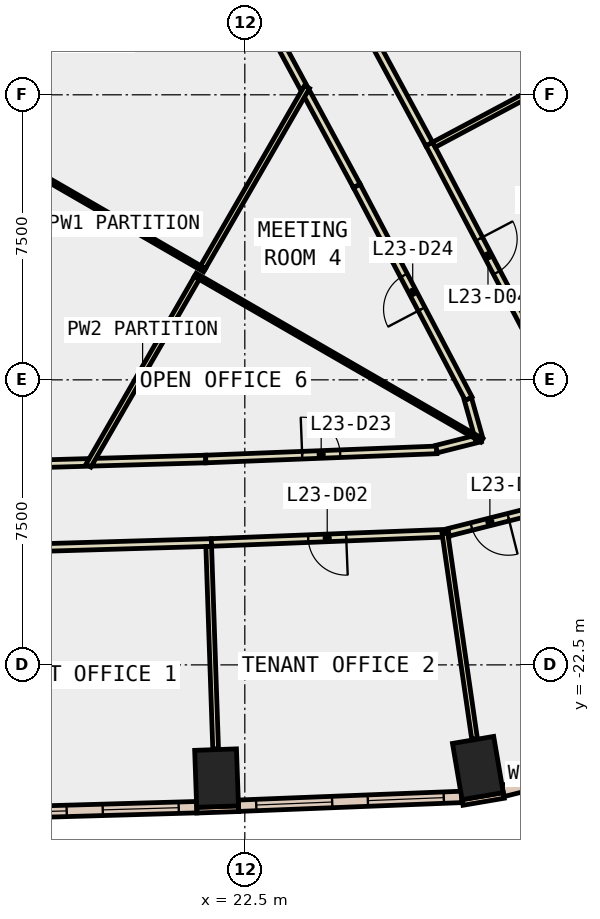
"""IFC4 building model, lengths in metres.
Left out: names, types, materials, properties, quantities, classifications, styles, units other than length and angle.
Written with IfcOpenShell. Run it as: python <this file> out.ifc"""

import sys

from ifc_helpers import new_model, si_unit, direction, frame, frame_2d, origin, origin_2d, place, context, subcontext, project, spatial, rectangle, extrude, element, fill, save


model = new_model("IFC4")
c1 = context("Model", 3, precision=1e-05, world=origin(), true_north=direction((0.0, 1.0)))
c2 = subcontext(c1, "Body", "Model", "MODEL_VIEW")
j1 = project(units=[si_unit("LENGTHUNIT", "METRE"), si_unit("PLANEANGLEUNIT", "RADIAN")], contexts=[c1])
p1 = place(None, origin())
s1 = spatial("IfcSite", under=j1, at=p1, CompositionType="ELEMENT")
p2 = place(p1, origin())
s2 = spatial("IfcBuilding", under=s1, at=p2, CompositionType="ELEMENT")
p3 = place(p2, frame((0.0, 0.0, 107.6)))
s3 = spatial("IfcBuildingStorey", under=s2, at=p3, CompositionType="ELEMENT", Elevation=107.6)
for number, where, z_axis, x_axis in (
    (1, (21.757, -25.479, -0.4), (0.0, 0.0, 1.0), (0.999, 0.035, 0.0)),
    (2, (28.633, -25.214, -0.4), (0.0, 0.0, 1.0), (0.986, 0.168, 0.0)),
):
    element("IfcColumn", number, at=place(p3, frame(where, z_axis=z_axis, x_axis=x_axis)), inside=s3, PredefinedType="COLUMN", context=c2, shape_type="SweptSolid", body=[
        extrude(rectangle(XDim=1.1, YDim=1.5, at=origin_2d()), origin(), (0.0, 0.0, 1.0), 4.2),
    ])
p4 = place(p3, frame((21.237, -26.323, 0.0), z_axis=(0.0, 0.0, 1.0), x_axis=(0.999368780235, 0.035525217693, 0.0)))
e3 = element("IfcWall", 3, at=p4, inside=s3, PredefinedType="STANDARD", context=c2, shape_type="SweptSolid", body=[
    extrude(rectangle(XDim=1.1, YDim=0.15, at=frame_2d((0.55, 0.0))), origin(), (0.0, 0.0, 1.0), 3.8),
])
p5 = place(p3, frame((28.229, -26.12, 0.0), z_axis=(0.0, 0.0, 1.0), x_axis=(0.985763338892, 0.168138751323, 0.0)))
e4 = element("IfcWall", 4, at=p5, inside=s3, PredefinedType="STANDARD", context=c2, shape_type="SweptSolid", body=[
    extrude(rectangle(XDim=1.101, YDim=0.15, at=frame_2d((0.55, 0.0))), origin(), (0.0, 0.0, 1.0), 3.8),
])
p6 = place(p3, frame((15.34, -26.413, 0.0), z_axis=(0.0, 0.0, 1.0), x_axis=(0.999588397616, 0.028688592709, 0.0)))
e5 = element("IfcWall", 5, at=p6, inside=s3, PredefinedType="STANDARD", context=c2, shape_type="SweptSolid", body=[
    extrude(rectangle(XDim=5.897, YDim=0.3, at=frame_2d((2.949, 0.0))), origin(), (0.0, 0.0, 1.0), 3.8),
])
p7 = place(p6, frame((0.474, 0.0, 0.9)))
e6 = element("IfcOpeningElement", 6, at=p7, cuts=e5, PredefinedType="OPENING", context=c2, shape_type="SweptSolid", body=[
    extrude(rectangle(XDim=2.0, YDim=2.6, at=frame_2d((1.0, 1.3))), frame((0.0, 0.16, 0.0), z_axis=(0.0, -1.0, 0.0), x_axis=(1.0, 0.0, 0.0)), (0.0, 0.0, 1.0), 0.32),
])
p8 = place(p6, frame((3.423, 0.0, 0.9)))
e7 = element("IfcOpeningElement", 7, at=p8, cuts=e5, PredefinedType="OPENING", context=c2, shape_type="SweptSolid", body=[
    extrude(rectangle(XDim=2.0, YDim=2.6, at=frame_2d((1.0, 1.3))), frame((0.0, 0.16, 0.0), z_axis=(0.0, -1.0, 0.0), x_axis=(1.0, 0.0, 0.0)), (0.0, 0.0, 1.0), 0.32),
])
p9 = place(p3, frame((22.332, -26.206, 0.0), z_axis=(0.0, 0.0, 1.0), x_axis=(0.99922113396, 0.039460428885, 0.0)))
e8 = element("IfcWall", 8, at=p9, inside=s3, PredefinedType="STANDARD", context=c2, shape_type="SweptSolid", body=[
    extrude(rectangle(XDim=5.878, YDim=0.3, at=frame_2d((2.939, 0.0))), origin(), (0.0, 0.0, 1.0), 3.8),
])
p10 = place(p9, frame((0.469, 0.0, 0.9)))
e9 = element("IfcOpeningElement", 9, at=p10, cuts=e8, PredefinedType="OPENING", context=c2, shape_type="SweptSolid", body=[
    extrude(rectangle(XDim=2.0, YDim=2.6, at=frame_2d((1.0, 1.3))), frame((0.0, 0.16, 0.0), z_axis=(0.0, -1.0, 0.0), x_axis=(1.0, 0.0, 0.0)), (0.0, 0.0, 1.0), 0.32),
])
p11 = place(p9, frame((3.408, 0.0, 0.9)))
e10 = element("IfcOpeningElement", 10, at=p11, cuts=e8, PredefinedType="OPENING", context=c2, shape_type="SweptSolid", body=[
    extrude(rectangle(XDim=2.0, YDim=2.6, at=frame_2d((1.0, 1.3))), frame((0.0, 0.16, 0.0), z_axis=(0.0, -1.0, 0.0), x_axis=(1.0, 0.0, 0.0)), (0.0, 0.0, 1.0), 0.32),
])
p12 = place(p3, frame((29.293, -25.818, 0.0), z_axis=(0.0, 0.0, 1.0), x_axis=(0.969658938481, 0.244461741432, 0.0)))
e11 = element("IfcWall", 11, at=p12, inside=s3, PredefinedType="STANDARD", context=c2, shape_type="SweptSolid", body=[
    extrude(rectangle(XDim=3.727, YDim=0.3, at=frame_2d((1.864, 0.0))), origin(), (0.0, 0.0, 1.0), 3.8),
])
p13 = place(p12, frame((1.164, 0.0, 0.9)))
e12 = element("IfcOpeningElement", 12, at=p13, cuts=e11, PredefinedType="OPENING", context=c2, shape_type="SweptSolid", body=[
    extrude(rectangle(XDim=1.4, YDim=2.6, at=frame_2d((0.7, 1.3))), frame((0.0, 0.16, 0.0), z_axis=(0.0, -1.0, 0.0), x_axis=(1.0, 0.0, 0.0)), (0.0, 0.0, 1.0), 0.32),
])
p14 = place(p3, frame((14.519, -17.283, 0.0), z_axis=(0.0, 0.0, 1.0), x_axis=(0.999591204998, 0.028590608419, 0.0)))
e13 = element("IfcWall", 13, at=p14, inside=s3, PredefinedType="PARTITIONING", context=c2, shape_type="SweptSolid", body=[
    extrude(rectangle(XDim=3.843, YDim=0.2, at=frame_2d((1.921, 0.0))), origin(), (0.0, 0.0, 1.0), 3.8),
])
p15 = place(p3, frame((24.051, -7.315, 0.0), z_axis=(0.0, 0.0, 1.0), x_axis=(-0.475308630647, 0.87981913234, 0.0)))
e14 = element("IfcWall", 14, at=p15, inside=s3, PredefinedType="PARTITIONING", context=c2, shape_type="SweptSolid", body=[
    extrude(rectangle(XDim=4.166, YDim=0.2, at=frame_2d((2.083, 0.0))), origin(), (0.0, 0.0, 1.0), 3.8),
])
p16 = place(p3, frame((18.509, -17.168, 0.0), z_axis=(0.0, 0.0, 1.0), x_axis=(0.999588854267, 0.028672677323, 0.0)))
e15 = element("IfcWall", 15, at=p16, inside=s3, PredefinedType="PARTITIONING", context=c2, shape_type="SweptSolid", body=[
    extrude(rectangle(XDim=2.963, YDim=0.2, at=frame_2d((1.481, 0.0))), origin(), (0.0, 0.0, 1.0), 3.8),
])
p17 = place(p3, frame((21.471, -17.083, 0.0), z_axis=(0.0, 0.0, 1.0), x_axis=(0.999221407079, 0.039453512338, 0.0)))
e16 = element("IfcWall", 16, at=p17, inside=s3, PredefinedType="PARTITIONING", context=c2, shape_type="SweptSolid", body=[
    extrude(rectangle(XDim=6.083, YDim=0.2, at=frame_2d((3.042, 0.0))), origin(), (0.0, 0.0, 1.0), 3.8),
])
p18 = place(p17, frame((2.541, 0.0, 0.0)))
e17 = element("IfcOpeningElement", 17, at=p18, cuts=e16, PredefinedType="OPENING", context=c2, shape_type="SweptSolid", body=[
    extrude(rectangle(XDim=1.0, YDim=2.1, at=frame_2d((0.5, 1.05))), frame((0.0, 0.11, 0.0), z_axis=(0.0, -1.0, 0.0), x_axis=(1.0, 0.0, 0.0)), (0.0, 0.0, 1.0), 0.22),
])
p19 = place(p3, frame((27.546, -16.822, 0.0), z_axis=(0.0, 0.0, 1.0), x_axis=(0.969694756333, 0.244319625777, 0.0)))
e18 = element("IfcWall", 18, at=p19, inside=s3, PredefinedType="PARTITIONING", context=c2, shape_type="SweptSolid", body=[
    extrude(rectangle(XDim=1.191, YDim=0.2, at=frame_2d((0.596, 0.0))), origin(), (0.0, 0.0, 1.0), 3.8),
])
p20 = place(p3, frame((28.662, -16.541, 0.0), z_axis=(0.0, 0.0, 1.0), x_axis=(-0.270771802087, 0.96264356394, 0.0)))
e19 = element("IfcWall", 19, at=p20, inside=s3, PredefinedType="PARTITIONING", context=c2, shape_type="SweptSolid", body=[
    extrude(rectangle(XDim=1.078, YDim=0.2, at=frame_2d((0.539, 0.0))), origin(), (0.0, 0.0, 1.0), 3.8),
])
p21 = place(p3, frame((28.39, -15.495, 0.0), z_axis=(0.0, 0.0, 1.0), x_axis=(-0.465367816287, 0.885117390838, 0.0)))
e20 = element("IfcWall", 20, at=p21, inside=s3, PredefinedType="PARTITIONING", context=c2, shape_type="SweptSolid", body=[
    extrude(rectangle(XDim=6.326, YDim=0.2, at=frame_2d((3.163, 0.0))), origin(), (0.0, 0.0, 1.0), 3.8),
])
p22 = place(p21, frame((2.663, 0.0, 0.0)))
e21 = element("IfcOpeningElement", 21, at=p22, cuts=e20, PredefinedType="OPENING", context=c2, shape_type="SweptSolid", body=[
    extrude(rectangle(XDim=1.0, YDim=2.1, at=frame_2d((0.5, 1.05))), frame((0.0, 0.11, 0.0), z_axis=(0.0, -1.0, 0.0), x_axis=(1.0, 0.0, 0.0)), (0.0, 0.0, 1.0), 0.22),
])
p23 = place(p3, frame((25.446, -9.896, 0.0), z_axis=(0.0, 0.0, 1.0), x_axis=(-0.475427182652, 0.879755076141, 0.0)))
e22 = element("IfcWall", 22, at=p23, inside=s3, PredefinedType="PARTITIONING", context=c2, shape_type="SweptSolid", body=[
    extrude(rectangle(XDim=2.785, YDim=0.2, at=frame_2d((1.393, 0.0))), origin(), (0.0, 0.0, 1.0), 3.8),
])
p24 = place(p3, frame((21.621, -19.28, 0.0), z_axis=(0.0, 0.0, 1.0), x_axis=(-0.999557957525, -0.029730280001, 0.0)))
e23 = element("IfcWall", 23, at=p24, inside=s3, PredefinedType="PARTITIONING", context=c2, shape_type="SweptSolid", body=[
    extrude(rectangle(XDim=13.927, YDim=0.2, at=frame_2d((6.964, 0.0))), origin(), (0.0, 0.0, 1.0), 3.8),
])
p25 = place(p24, frame((6.464, 0.0, 0.0)))
e24 = element("IfcOpeningElement", 24, at=p25, cuts=e23, PredefinedType="OPENING", context=c2, shape_type="SweptSolid", body=[
    extrude(rectangle(XDim=1.0, YDim=2.1, at=frame_2d((0.5, 1.05))), frame((0.0, 0.11, 0.0), z_axis=(0.0, -1.0, 0.0), x_axis=(1.0, 0.0, 0.0)), (0.0, 0.0, 1.0), 0.22),
])
p26 = place(p3, frame((27.865, -19.032, 0.0), z_axis=(0.0, 0.0, 1.0), x_axis=(-0.999218029978, -0.039538950003, 0.0)))
e25 = element("IfcWall", 25, at=p26, inside=s3, PredefinedType="PARTITIONING", context=c2, shape_type="SweptSolid", body=[
    extrude(rectangle(XDim=6.249, YDim=0.2, at=frame_2d((3.125, 0.0))), origin(), (0.0, 0.0, 1.0), 3.8),
])
p27 = place(p26, frame((2.699, 0.0, 0.0)))
e26 = element("IfcOpeningElement", 26, at=p27, cuts=e25, PredefinedType="OPENING", context=c2, shape_type="SweptSolid", body=[
    extrude(rectangle(XDim=1.0, YDim=2.1, at=frame_2d((0.5, 1.05))), frame((0.0, 0.11, 0.0), z_axis=(0.0, -1.0, 0.0), x_axis=(1.0, 0.0, 0.0)), (0.0, 0.0, 1.0), 0.22),
])
p28 = place(p3, frame((30.037, -18.463, 0.0), z_axis=(0.0, 0.0, 1.0), x_axis=(-0.969686214682, -0.244353524746, 0.0)))
e27 = element("IfcWall", 27, at=p28, inside=s3, PredefinedType="PARTITIONING", context=c2, shape_type="SweptSolid", body=[
    extrude(rectangle(XDim=2.243, YDim=0.2, at=frame_2d((1.122, 0.0))), origin(), (0.0, 0.0, 1.0), 3.8),
])
p29 = place(p28, frame((0.622, 0.0, 0.0)))
e28 = element("IfcOpeningElement", 28, at=p29, cuts=e27, PredefinedType="OPENING", context=c2, shape_type="SweptSolid", body=[
    extrude(rectangle(XDim=1.0, YDim=2.1, at=frame_2d((0.5, 1.05))), frame((0.0, 0.11, 0.0), z_axis=(0.0, -1.0, 0.0), x_axis=(1.0, 0.0, 0.0)), (0.0, 0.0, 1.0), 0.22),
])
p30 = place(p3, frame((27.353, -8.794, 0.0), z_axis=(0.0, 0.0, 1.0), x_axis=(0.465239168813, -0.885185017836, 0.0)))
e29 = element("IfcWall", 29, at=p30, inside=s3, PredefinedType="PARTITIONING", context=c2, shape_type="SweptSolid", body=[
    extrude(rectangle(XDim=6.646, YDim=0.2, at=frame_2d((3.323, 0.0))), origin(), (0.0, 0.0, 1.0), 3.8),
])
p31 = place(p30, frame((2.823, 0.0, 0.0)))
e30 = element("IfcOpeningElement", 30, at=p31, cuts=e29, PredefinedType="OPENING", context=c2, shape_type="SweptSolid", body=[
    extrude(rectangle(XDim=1.0, YDim=2.1, at=frame_2d((0.5, 1.05))), frame((0.0, 0.11, 0.0), z_axis=(0.0, -1.0, 0.0), x_axis=(1.0, 0.0, 0.0)), (0.0, 0.0, 1.0), 0.22),
])
p32 = place(p3, frame((24.0, -2.593, 0.0), z_axis=(0.0, 0.0, 1.0), x_axis=(0.475480817472, -0.879726089312, 0.0)))
e31 = element("IfcWall", 31, at=p32, inside=s3, PredefinedType="PARTITIONING", context=c2, shape_type="SweptSolid", body=[
    extrude(rectangle(XDim=7.05, YDim=0.2, at=frame_2d((3.525, 0.0))), origin(), (0.0, 0.0, 1.0), 3.8),
])
p33 = place(p32, frame((3.1, 0.0, 0.0)))
e32 = element("IfcOpeningElement", 32, at=p33, cuts=e31, PredefinedType="OPENING", context=c2, shape_type="SweptSolid", body=[
    extrude(rectangle(XDim=1.0, YDim=2.1, at=frame_2d((0.5, 1.05))), frame((0.0, 0.11, 0.0), z_axis=(0.0, -1.0, 0.0), x_axis=(1.0, 0.0, 0.0)), (0.0, 0.0, 1.0), 0.22),
])
p34 = place(p3, frame((18.503, 2.949, 0.0), z_axis=(0.0, 0.0, 1.0), x_axis=(-0.49997390151, -0.86604047123, 0.0)))
e33 = element("IfcWall", 33, at=p34, inside=s3, PredefinedType="PARTITIONING", context=c2, shape_type="SweptSolid", body=[
    extrude(rectangle(XDim=11.626, YDim=0.2, at=frame_2d((5.813, 0.0))), origin(), (0.0, 0.0, 1.0), 3.8),
])
p35 = place(p3, frame((17.219, -9.676, 0.0), z_axis=(0.0, 0.0, 1.0), x_axis=(0.86598459596, -0.500070674565, 0.0)))
e34 = element("IfcWall", 34, at=p35, inside=s3, PredefinedType="PARTITIONING", context=c2, shape_type="SweptSolid", body=[
    extrude(rectangle(XDim=4.875, YDim=0.1, at=frame_2d((2.438, 0.0))), origin(), (0.0, 0.0, 1.0), 3.8),
])
p36 = place(p3, frame((21.236, -12.319, 0.0), z_axis=(0.0, 0.0, 1.0), x_axis=(-0.500016488359, -0.866015884017, 0.0)))
e35 = element("IfcWall", 35, at=p36, inside=s3, PredefinedType="PARTITIONING", context=c2, shape_type="SweptSolid", body=[
    extrude(rectangle(XDim=5.702, YDim=0.15, at=frame_2d((2.851, 0.0))), origin(), (0.0, 0.0, 1.0), 3.8),
])
p37 = place(p3, frame((24.137, -7.294, 0.0), z_axis=(0.0, 0.0, 1.0), x_axis=(-0.500001804394, -0.866024362014, 0.0)))
e36 = element("IfcWall", 36, at=p37, inside=s3, PredefinedType="PARTITIONING", context=c2, shape_type="SweptSolid", body=[
    extrude(rectangle(XDim=5.472, YDim=0.15, at=frame_2d((2.736, 0.0))), origin(), (0.0, 0.0, 1.0), 3.8),
])
p38 = place(p3, frame((21.196, -12.238, 0.0), z_axis=(0.0, 0.0, 1.0), x_axis=(0.866023145199, -0.500003911965, 0.0)))
e37 = element("IfcWall", 37, at=p38, inside=s3, PredefinedType="PARTITIONING", context=c2, shape_type="SweptSolid", body=[
    extrude(rectangle(XDim=8.71, YDim=0.1, at=frame_2d((4.355, 0.0))), origin(), (0.0, 0.0, 1.0), 3.8),
])
p39 = place(p3, frame((21.55, -19.382, 0.0), z_axis=(0.0, 0.0, 1.0), x_axis=(0.034124666577, -0.999417583961, 0.0)))
e38 = element("IfcWall", 38, at=p39, inside=s3, PredefinedType="PARTITIONING", context=c2, shape_type="SweptSolid", body=[
    extrude(rectangle(XDim=5.33, YDim=0.15, at=frame_2d((2.665, 0.0))), origin(), (0.0, 0.0, 1.0), 3.8),
])
p40 = place(p3, frame((27.765, -19.036, 0.0), z_axis=(0.0, 0.0, 1.0), x_axis=(0.142827612329, -0.989747580526, 0.0)))
e39 = element("IfcWall", 39, at=p40, inside=s3, PredefinedType="PARTITIONING", context=c2, shape_type="SweptSolid", body=[
    extrude(rectangle(XDim=5.468, YDim=0.15, at=frame_2d((2.734, 0.0))), origin(), (0.0, 0.0, 1.0), 3.8),
])
p41 = place(p3, frame((27.476, -8.814, 0.0), z_axis=(0.0, 0.0, 1.0), x_axis=(0.882440424847, 0.47042416668, 0.0)))
e40 = element("IfcWall", 40, at=p41, inside=s3, PredefinedType="PARTITIONING", context=c2, shape_type="SweptSolid", body=[
    extrude(rectangle(XDim=5.329, YDim=0.15, at=frame_2d((2.665, 0.0))), origin(), (0.0, 0.0, 1.0), 3.8),
])
p42 = place(p7, origin())
e41 = element("IfcWindow", 41, at=p42, inside=s3, PartitioningType="SINGLE_PANEL", PredefinedType="WINDOW", context=c2, shape_type="SweptSolid", body=[
    extrude(rectangle(XDim=2.0, YDim=2.6, at=frame_2d((1.0, 1.3))), frame((0.0, 0.03, 0.0), z_axis=(0.0, -1.0, 0.0), x_axis=(1.0, 0.0, 0.0)), (0.0, 0.0, 1.0), 0.06),
])
fill(e6, e41)
p43 = place(p8, origin())
e42 = element("IfcWindow", 42, at=p43, inside=s3, PartitioningType="SINGLE_PANEL", PredefinedType="WINDOW", context=c2, shape_type="SweptSolid", body=[
    extrude(rectangle(XDim=2.0, YDim=2.6, at=frame_2d((1.0, 1.3))), frame((0.0, 0.03, 0.0), z_axis=(0.0, -1.0, 0.0), x_axis=(1.0, 0.0, 0.0)), (0.0, 0.0, 1.0), 0.06),
])
fill(e7, e42)
p44 = place(p10, origin())
e43 = element("IfcWindow", 43, at=p44, inside=s3, PartitioningType="SINGLE_PANEL", PredefinedType="WINDOW", context=c2, shape_type="SweptSolid", body=[
    extrude(rectangle(XDim=2.0, YDim=2.6, at=frame_2d((1.0, 1.3))), frame((0.0, 0.03, 0.0), z_axis=(0.0, -1.0, 0.0), x_axis=(1.0, 0.0, 0.0)), (0.0, 0.0, 1.0), 0.06),
])
fill(e9, e43)
p45 = place(p11, origin())
e44 = element("IfcWindow", 44, at=p45, inside=s3, PartitioningType="SINGLE_PANEL", PredefinedType="WINDOW", context=c2, shape_type="SweptSolid", body=[
    extrude(rectangle(XDim=2.0, YDim=2.6, at=frame_2d((1.0, 1.3))), frame((0.0, 0.03, 0.0), z_axis=(0.0, -1.0, 0.0), x_axis=(1.0, 0.0, 0.0)), (0.0, 0.0, 1.0), 0.06),
])
fill(e10, e44)
p46 = place(p27, origin())
e45 = element("IfcDoor", 45, at=p46, inside=s3, OperationType="SINGLE_SWING_LEFT", PredefinedType="DOOR", context=c2, shape_type="SweptSolid", body=[
    extrude(rectangle(XDim=1.0, YDim=2.1, at=frame_2d((0.5, 1.05))), frame((0.0, 0.025, 0.0), z_axis=(0.0, -1.0, 0.0), x_axis=(1.0, 0.0, 0.0)), (0.0, 0.0, 1.0), 0.05),
])
fill(e26, e45)
p47 = place(p29, origin())
e46 = element("IfcDoor", 46, at=p47, inside=s3, OperationType="SINGLE_SWING_LEFT", PredefinedType="DOOR", context=c2, shape_type="SweptSolid", body=[
    extrude(rectangle(XDim=1.0, YDim=2.1, at=frame_2d((0.5, 1.05))), frame((0.0, 0.025, 0.0), z_axis=(0.0, -1.0, 0.0), x_axis=(1.0, 0.0, 0.0)), (0.0, 0.0, 1.0), 0.05),
])
fill(e28, e46)
p48 = place(p31, origin())
e47 = element("IfcDoor", 47, at=p48, inside=s3, OperationType="SINGLE_SWING_LEFT", PredefinedType="DOOR", context=c2, shape_type="SweptSolid", body=[
    extrude(rectangle(XDim=1.0, YDim=2.1, at=frame_2d((0.5, 1.05))), frame((0.0, 0.025, 0.0), z_axis=(0.0, -1.0, 0.0), x_axis=(1.0, 0.0, 0.0)), (0.0, 0.0, 1.0), 0.05),
])
fill(e30, e47)
p49 = place(p18, origin())
e48 = element("IfcDoor", 48, at=p49, inside=s3, OperationType="SINGLE_SWING_LEFT", PredefinedType="DOOR", context=c2, shape_type="SweptSolid", body=[
    extrude(rectangle(XDim=1.0, YDim=2.1, at=frame_2d((0.5, 1.05))), frame((0.0, 0.025, 0.0), z_axis=(0.0, -1.0, 0.0), x_axis=(1.0, 0.0, 0.0)), (0.0, 0.0, 1.0), 0.05),
])
fill(e17, e48)
p50 = place(p22, origin())
e49 = element("IfcDoor", 49, at=p50, inside=s3, OperationType="SINGLE_SWING_LEFT", PredefinedType="DOOR", context=c2, shape_type="SweptSolid", body=[
    extrude(rectangle(XDim=1.0, YDim=2.1, at=frame_2d((0.5, 1.05))), frame((0.0, 0.025, 0.0), z_axis=(0.0, -1.0, 0.0), x_axis=(1.0, 0.0, 0.0)), (0.0, 0.0, 1.0), 0.05),
])
fill(e21, e49)
save(model, sys.argv[1])
